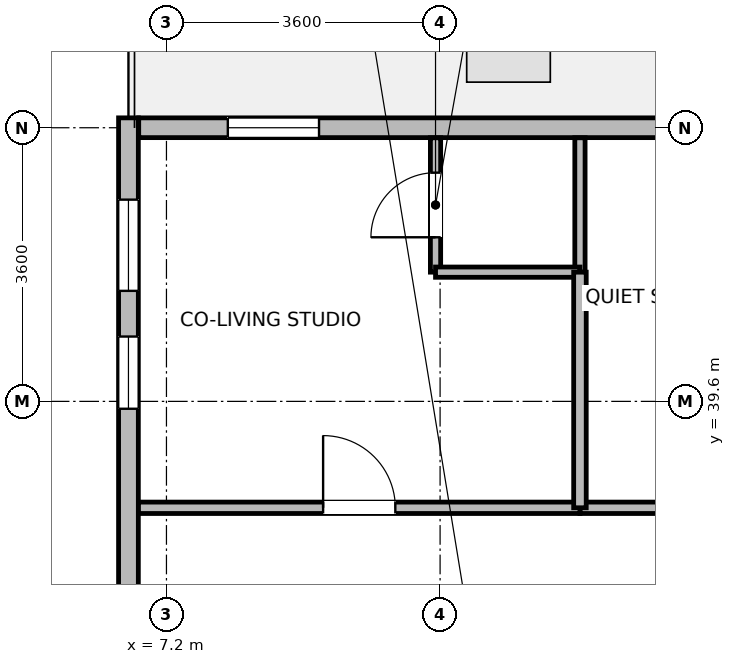
"""IFC4 building model, lengths in metres.
Left out: names, types, materials, properties, quantities, classifications, styles, units other than length and angle.
Written with IfcOpenShell. Run it as: python <this file> out.ifc"""

import sys

from ifc_helpers import new_model, si_unit, direction, frame, frame_2d, origin, place, context, subcontext, project, spatial, rectangle, extrude, element, fill, save


model = new_model("IFC4")
c1 = context("Model", 3, precision=1e-05, world=origin(), true_north=direction((0.0, 1.0)))
c2 = subcontext(c1, "Body", "Model", "MODEL_VIEW")
j1 = project(units=[si_unit("LENGTHUNIT", "METRE"), si_unit("PLANEANGLEUNIT", "RADIAN")], contexts=[c1])
p1 = place(None, origin())
s1 = spatial("IfcSite", under=j1, at=p1, CompositionType="ELEMENT")
p2 = place(p1, origin())
s2 = spatial("IfcBuilding", under=s1, at=p2, CompositionType="ELEMENT")
p3 = place(p2, frame((0.0, 0.0, 238.8)))
s3 = spatial("IfcBuildingStorey", under=s2, at=p3, CompositionType="ELEMENT", Elevation=238.8)
p4 = place(p3, frame((6.835, 43.2, 0.0), z_axis=(0.0, 0.0, 1.0), x_axis=(1.0, 0.0, 0.0)))
e1 = element("IfcWall", 1, at=p4, inside=s3, PredefinedType="STANDARD", context=c2, shape_type="SweptSolid", body=[
    extrude(rectangle(XDim=7.089, YDim=0.26, at=frame_2d((3.544, 0.0))), origin(), (0.0, 0.0, 1.0), 3.42),
])
p5 = place(p4, frame((1.172, 0.0, 0.85)))
e2 = element("IfcOpeningElement", 2, at=p5, cuts=e1, PredefinedType="OPENING", context=c2, shape_type="SweptSolid", body=[
    extrude(rectangle(XDim=1.2, YDim=1.75, at=frame_2d((0.6, 0.875))), frame((0.0, 0.14, 0.0), z_axis=(0.0, -1.0, 0.0), x_axis=(1.0, 0.0, 0.0)), (0.0, 0.0, 1.0), 0.28),
])
p6 = place(p3, frame((6.7, 36.626, 0.0), z_axis=(0.0, 0.0, 1.0), x_axis=(0.0, 1.0, 0.0)))
e3 = element("IfcWall", 3, at=p6, inside=s3, PredefinedType="STANDARD", context=c2, shape_type="SweptSolid", body=[
    extrude(rectangle(XDim=6.704, YDim=0.26, at=frame_2d((3.352, 0.0))), origin(), (0.0, 0.0, 1.0), 3.42),
])
p7 = place(p6, frame((4.428, 0.0, 0.85)))
e4 = element("IfcOpeningElement", 4, at=p7, cuts=e3, PredefinedType="OPENING", context=c2, shape_type="SweptSolid", body=[
    extrude(rectangle(XDim=1.2, YDim=1.75, at=frame_2d((0.6, 0.875))), frame((0.0, 0.14, 0.0), z_axis=(0.0, -1.0, 0.0), x_axis=(1.0, 0.0, 0.0)), (0.0, 0.0, 1.0), 0.28),
])
p8 = place(p6, frame((2.877, 0.0, 0.85)))
e5 = element("IfcOpeningElement", 5, at=p8, cuts=e3, PredefinedType="OPENING", context=c2, shape_type="SweptSolid", body=[
    extrude(rectangle(XDim=0.95, YDim=1.75, at=frame_2d((0.475, 0.875))), frame((0.0, 0.14, 0.0), z_axis=(0.0, -1.0, 0.0), x_axis=(1.0, 0.0, 0.0)), (0.0, 0.0, 1.0), 0.28),
])
p9 = place(p3, frame((10.74, 41.3, 0.0), z_axis=(0.0, 0.0, 1.0), x_axis=(0.0, 1.0, 0.0)))
e6 = element("IfcWall", 6, at=p9, inside=s3, PredefinedType="PARTITIONING", context=c2, shape_type="SweptSolid", body=[
    extrude(rectangle(XDim=1.768, YDim=0.135, at=frame_2d((0.884, 0.0))), origin(), (0.0, 0.0, 1.0), 3.42),
])
p10 = place(p9, frame((0.459, 0.0, 0.0)))
e7 = element("IfcOpeningElement", 7, at=p10, cuts=e6, PredefinedType="OPENING", context=c2, shape_type="SweptSolid", body=[
    extrude(rectangle(XDim=0.85, YDim=2.04, at=frame_2d((0.425, 1.02))), frame((0.0, 0.078, 0.0), z_axis=(0.0, -1.0, 0.0), x_axis=(1.0, 0.0, 0.0)), (0.0, 0.0, 1.0), 0.155),
])
p11 = place(p3, frame((12.64, 41.3, 0.0), z_axis=(0.0, 0.0, 1.0), x_axis=(0.0, 1.0, 0.0)))
e8 = element("IfcWall", 8, at=p11, inside=s3, PredefinedType="PARTITIONING", context=c2, shape_type="SweptSolid", body=[
    extrude(rectangle(XDim=1.768, YDim=0.135, at=frame_2d((0.884, 0.0))), origin(), (0.0, 0.0, 1.0), 3.42),
])
p12 = place(p3, frame((10.74, 41.3, 0.0), z_axis=(0.0, 0.0, 1.0), x_axis=(1.0, 0.0, 0.0)))
e9 = element("IfcWall", 9, at=p12, inside=s3, PredefinedType="PARTITIONING", context=c2, shape_type="SweptSolid", body=[
    extrude(rectangle(XDim=1.9, YDim=0.135, at=frame_2d((0.95, 0.0))), origin(), (0.0, 0.0, 1.0), 3.42),
])
p13 = place(p3, frame((12.64, 38.2, 0.0), z_axis=(0.0, 0.0, 1.0), x_axis=(1.0, 0.0, 0.0)))
e10 = element("IfcWall", 10, at=p13, inside=s3, PredefinedType="PARTITIONING", context=c2, shape_type="SweptSolid", body=[
    extrude(rectangle(XDim=7.0, YDim=0.15, at=frame_2d((3.5, 0.0))), origin(), (0.0, 0.0, 1.0), 3.42),
])
p14 = place(p13, frame((2.85, 0.0, 0.0)))
e11 = element("IfcOpeningElement", 11, at=p14, cuts=e10, PredefinedType="OPENING", context=c2, shape_type="SweptSolid", body=[
    extrude(rectangle(XDim=1.3, YDim=2.12, at=frame_2d((0.65, 1.06))), frame((0.0, 0.085, 0.0), z_axis=(0.0, -1.0, 0.0), x_axis=(1.0, 0.0, 0.0)), (0.0, 0.0, 1.0), 0.17),
])
p15 = place(p3, frame((6.832, 38.2, 0.0), z_axis=(0.0, 0.0, 1.0), x_axis=(1.0, 0.0, 0.0)))
e12 = element("IfcWall", 12, at=p15, inside=s3, PredefinedType="PARTITIONING", context=c2, shape_type="SweptSolid", body=[
    extrude(rectangle(XDim=5.808, YDim=0.15, at=frame_2d((2.904, 0.0))), origin(), (0.0, 0.0, 1.0), 3.42),
])
p16 = place(p15, frame((2.429, 0.0, 0.0)))
e13 = element("IfcOpeningElement", 13, at=p16, cuts=e12, PredefinedType="OPENING", context=c2, shape_type="SweptSolid", body=[
    extrude(rectangle(XDim=0.95, YDim=2.1, at=frame_2d((0.475, 1.05))), frame((0.0, 0.085, 0.0), z_axis=(0.0, -1.0, 0.0), x_axis=(1.0, 0.0, 0.0)), (0.0, 0.0, 1.0), 0.17),
])
p17 = place(p3, frame((12.64, 38.2, 0.0), z_axis=(0.0, 0.0, 1.0), x_axis=(0.0, 1.0, 0.0)))
e14 = element("IfcWall", 14, at=p17, inside=s3, PredefinedType="PARTITIONING", context=c2, shape_type="SweptSolid", body=[
    extrude(rectangle(XDim=3.1, YDim=0.165, at=frame_2d((1.55, 0.0))), origin(), (0.0, 0.0, 1.0), 3.42),
])
p18 = place(p5, origin())
e15 = element("IfcWindow", 15, at=p18, inside=s3, PartitioningType="SINGLE_PANEL", PredefinedType="WINDOW", context=c2, shape_type="SweptSolid", body=[
    extrude(rectangle(XDim=1.2, YDim=1.75, at=frame_2d((0.6, 0.875))), frame((0.0, 0.03, 0.0), z_axis=(0.0, -1.0, 0.0), x_axis=(1.0, 0.0, 0.0)), (0.0, 0.0, 1.0), 0.06),
])
fill(e2, e15)
p19 = place(p7, origin())
e16 = element("IfcWindow", 16, at=p19, inside=s3, PartitioningType="SINGLE_PANEL", PredefinedType="WINDOW", context=c2, shape_type="SweptSolid", body=[
    extrude(rectangle(XDim=1.2, YDim=1.75, at=frame_2d((0.6, 0.875))), frame((0.0, 0.03, 0.0), z_axis=(0.0, -1.0, 0.0), x_axis=(1.0, 0.0, 0.0)), (0.0, 0.0, 1.0), 0.06),
])
fill(e4, e16)
p20 = place(p8, origin())
e17 = element("IfcWindow", 17, at=p20, inside=s3, PartitioningType="SINGLE_PANEL", PredefinedType="WINDOW", context=c2, shape_type="SweptSolid", body=[
    extrude(rectangle(XDim=0.95, YDim=1.75, at=frame_2d((0.475, 0.875))), frame((0.0, 0.03, 0.0), z_axis=(0.0, -1.0, 0.0), x_axis=(1.0, 0.0, 0.0)), (0.0, 0.0, 1.0), 0.06),
])
fill(e5, e17)
p21 = place(p10, origin())
e18 = element("IfcDoor", 18, at=p21, inside=s3, OperationType="SINGLE_SWING_LEFT", PredefinedType="DOOR", context=c2, shape_type="SweptSolid", body=[
    extrude(rectangle(XDim=0.85, YDim=2.04, at=frame_2d((0.425, 1.02))), frame((0.0, 0.025, 0.0), z_axis=(0.0, -1.0, 0.0), x_axis=(1.0, 0.0, 0.0)), (0.0, 0.0, 1.0), 0.05),
])
fill(e7, e18)
p22 = place(p16, origin())
e19 = element("IfcDoor", 19, at=p22, inside=s3, OperationType="SINGLE_SWING_LEFT", PredefinedType="DOOR", context=c2, shape_type="SweptSolid", body=[
    extrude(rectangle(XDim=0.95, YDim=2.1, at=frame_2d((0.475, 1.05))), frame((0.0, 0.025, 0.0), z_axis=(0.0, -1.0, 0.0), x_axis=(1.0, 0.0, 0.0)), (0.0, 0.0, 1.0), 0.05),
])
fill(e13, e19)
save(model, sys.argv[1])
